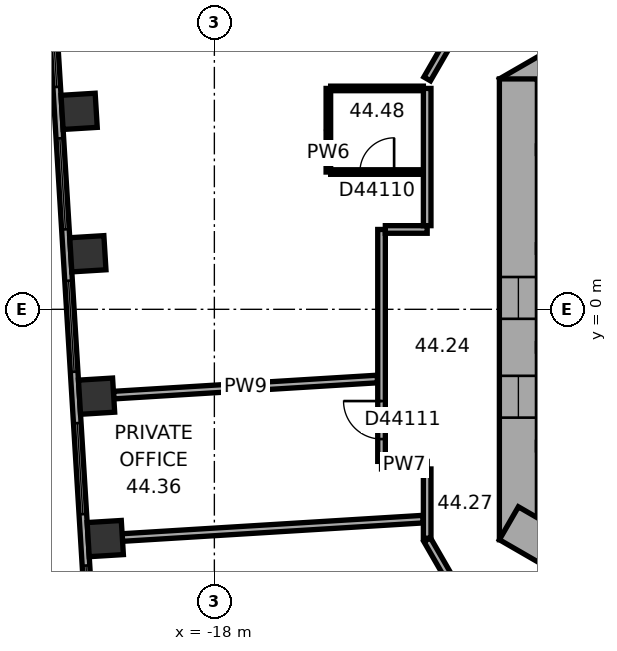
"""IFC4 building model, lengths in metres.
Left out: names, types, materials, properties, quantities, classifications, styles, units other than length and angle.
Written with IfcOpenShell. Run it as: python <this file> out.ifc"""

import sys

from ifc_helpers import new_model, si_unit, direction, frame, frame_2d, origin, origin_2d, place, context, subcontext, project, spatial, rectangle, extrude, element, fill, save


model = new_model("IFC4")
c1 = context("Model", 3, precision=1e-05, world=origin(), true_north=direction((0.0, 1.0)))
c2 = subcontext(c1, "Body", "Model", "MODEL_VIEW")
j1 = project(units=[si_unit("LENGTHUNIT", "METRE"), si_unit("PLANEANGLEUNIT", "RADIAN")], contexts=[c1])
p1 = place(None, origin())
s1 = spatial("IfcSite", under=j1, at=p1, CompositionType="ELEMENT")
p2 = place(p1, origin())
s2 = spatial("IfcBuilding", under=s1, at=p2, CompositionType="ELEMENT")
p3 = place(p2, frame((0.0, 0.0, 179.9)))
s3 = spatial("IfcBuildingStorey", under=s2, at=p3, CompositionType="ELEMENT", Elevation=179.9)
for number, where, z_axis, x_axis in (
    (1, (-21.558, 5.209, 0.0), (0.0, 0.0, 1.0), (0.061, -0.998, 0.0)),
    (2, (-21.329, 1.462, 0.0), (0.0, 0.0, 1.0), (0.061, -0.998, 0.0)),
    (3, (-21.1, -2.285, 0.0), (0.0, 0.0, 1.0), (0.061, -0.998, 0.0)),
    (4, (-20.871, -6.032, 0.0), (0.0, 0.0, 1.0), (0.061, -0.998, 0.0)),
):
    element("IfcColumn", number, at=place(p3, frame(where, z_axis=z_axis, x_axis=x_axis)), inside=s3, PredefinedType="COLUMN", context=c2, shape_type="SweptSolid", body=[
        extrude(rectangle(XDim=0.9, YDim=0.9, at=origin_2d()), origin(), (0.0, 0.0, 1.0), 3.7),
    ])
p4 = place(p3, frame((0.25, 11.691, 0.0), z_axis=(0.0, 0.0, 1.0), x_axis=(-0.866022616891, -0.50000482701, 0.0)))
e5 = element("IfcWall", 5, at=p4, inside=s3, PredefinedType="SHEAR", context=c2, shape_type="SweptSolid", body=[
    extrude(rectangle(XDim=12.125, YDim=1.0, at=frame_2d((6.062, 0.0))), origin(), (0.0, 0.0, 1.0), 3.7),
])
p5 = place(p4, frame((6.262, 0.0, 0.0)))
e6 = element("IfcOpeningElement", 6, at=p5, cuts=e5, PredefinedType="OPENING", context=c2, shape_type="SweptSolid", body=[
    extrude(rectangle(XDim=1.5, YDim=2.1, at=frame_2d((0.75, 1.05))), frame((0.0, 0.51, 0.0), z_axis=(0.0, -1.0, 0.0), x_axis=(1.0, 0.0, 0.0)), (0.0, 0.0, 1.0), 1.02),
])
p6 = place(p4, frame((1.812, 0.0, 0.0)))
e7 = element("IfcOpeningElement", 7, at=p6, cuts=e5, PredefinedType="OPENING", context=c2, shape_type="SweptSolid", body=[
    extrude(rectangle(XDim=0.9, YDim=2.1, at=frame_2d((0.45, 1.05))), frame((0.0, 0.51, 0.0), z_axis=(0.0, -1.0, 0.0), x_axis=(1.0, 0.0, 0.0)), (0.0, 0.0, 1.0), 1.02),
])
p7 = place(p4, frame((4.412, 0.0, 0.0)))
e8 = element("IfcOpeningElement", 8, at=p7, cuts=e5, PredefinedType="OPENING", context=c2, shape_type="SweptSolid", body=[
    extrude(rectangle(XDim=0.9, YDim=2.1, at=frame_2d((0.45, 1.05))), frame((0.0, 0.51, 0.0), z_axis=(0.0, -1.0, 0.0), x_axis=(1.0, 0.0, 0.0)), (0.0, 0.0, 1.0), 1.02),
])
p8 = place(p3, frame((-10.0, 6.062, 0.0), z_axis=(0.0, 0.0, 1.0), x_axis=(0.0, -1.0, 0.0)))
e9 = element("IfcWall", 9, at=p8, inside=s3, PredefinedType="SHEAR", context=c2, shape_type="SweptSolid", body=[
    extrude(rectangle(XDim=12.125, YDim=1.0, at=frame_2d((6.062, 0.0))), origin(), (0.0, 0.0, 1.0), 3.7),
])
p9 = place(p8, frame((5.212, 0.0, 0.0)))
e10 = element("IfcOpeningElement", 10, at=p9, cuts=e9, PredefinedType="OPENING", context=c2, shape_type="SweptSolid", body=[
    extrude(rectangle(XDim=1.1, YDim=2.1, at=frame_2d((0.55, 1.05))), frame((0.0, 0.51, 0.0), z_axis=(0.0, -1.0, 0.0), x_axis=(1.0, 0.0, 0.0)), (0.0, 0.0, 1.0), 1.02),
])
p10 = place(p8, frame((7.812, 0.0, 0.0)))
e11 = element("IfcOpeningElement", 11, at=p10, cuts=e9, PredefinedType="OPENING", context=c2, shape_type="SweptSolid", body=[
    extrude(rectangle(XDim=1.1, YDim=2.1, at=frame_2d((0.55, 1.05))), frame((0.0, 0.51, 0.0), z_axis=(0.0, -1.0, 0.0), x_axis=(1.0, 0.0, 0.0)), (0.0, 0.0, 1.0), 1.02),
])
p11 = place(p3, frame((-10.25, -5.629, 0.0), z_axis=(0.0, 0.0, 1.0), x_axis=(0.866022616891, -0.50000482701, 0.0)))
e12 = element("IfcWall", 12, at=p11, inside=s3, PredefinedType="SHEAR", context=c2, shape_type="SweptSolid", body=[
    extrude(rectangle(XDim=12.125, YDim=1.0, at=frame_2d((6.062, 0.0))), origin(), (0.0, 0.0, 1.0), 3.7),
])
p12 = place(p11, frame((6.262, 0.0, 0.0)))
e13 = element("IfcOpeningElement", 13, at=p12, cuts=e12, PredefinedType="OPENING", context=c2, shape_type="SweptSolid", body=[
    extrude(rectangle(XDim=1.5, YDim=2.1, at=frame_2d((0.75, 1.05))), frame((0.0, 0.51, 0.0), z_axis=(0.0, -1.0, 0.0), x_axis=(1.0, 0.0, 0.0)), (0.0, 0.0, 1.0), 1.02),
])
p13 = place(p11, frame((1.712, 0.0, 0.0)))
e14 = element("IfcOpeningElement", 14, at=p13, cuts=e12, PredefinedType="OPENING", context=c2, shape_type="SweptSolid", body=[
    extrude(rectangle(XDim=1.1, YDim=2.1, at=frame_2d((0.55, 1.05))), frame((0.0, 0.51, 0.0), z_axis=(0.0, -1.0, 0.0), x_axis=(1.0, 0.0, 0.0)), (0.0, 0.0, 1.0), 1.02),
])
p14 = place(p11, frame((4.312, 0.0, 0.0)))
e15 = element("IfcOpeningElement", 15, at=p14, cuts=e12, PredefinedType="OPENING", context=c2, shape_type="SweptSolid", body=[
    extrude(rectangle(XDim=1.1, YDim=2.1, at=frame_2d((0.55, 1.05))), frame((0.0, 0.51, 0.0), z_axis=(0.0, -1.0, 0.0), x_axis=(1.0, 0.0, 0.0)), (0.0, 0.0, 1.0), 1.02),
])
p15 = place(p3, frame((-22.375, 9.557, 0.0), z_axis=(0.0, 0.0, 1.0), x_axis=(0.061036015339, -0.998135564356, 0.0)))
e16 = element("IfcWall", 16, at=p15, inside=s3, PredefinedType="STANDARD", context=c2, shape_type="SweptSolid", body=[
    extrude(rectangle(XDim=20.044, YDim=0.2, at=frame_2d((10.022, 0.0))), origin(), (0.0, 0.0, 1.0), 3.7),
])
p16 = place(p15, frame((1.313, 0.0, 0.9)))
e17 = element("IfcOpeningElement", 17, at=p16, cuts=e16, PredefinedType="OPENING", context=c2, shape_type="SweptSolid", body=[
    extrude(rectangle(XDim=2.4, YDim=2.0, at=frame_2d((1.2, 1.0))), frame((0.0, 0.11, 0.0), z_axis=(0.0, -1.0, 0.0), x_axis=(1.0, 0.0, 0.0)), (0.0, 0.0, 1.0), 0.22),
])
p17 = place(p15, frame((5.067, 0.0, 0.9)))
e18 = element("IfcOpeningElement", 18, at=p17, cuts=e16, PredefinedType="OPENING", context=c2, shape_type="SweptSolid", body=[
    extrude(rectangle(XDim=2.4, YDim=2.0, at=frame_2d((1.2, 1.0))), frame((0.0, 0.11, 0.0), z_axis=(0.0, -1.0, 0.0), x_axis=(1.0, 0.0, 0.0)), (0.0, 0.0, 1.0), 0.22),
])
p18 = place(p15, frame((8.821, 0.0, 0.9)))
e19 = element("IfcOpeningElement", 19, at=p18, cuts=e16, PredefinedType="OPENING", context=c2, shape_type="SweptSolid", body=[
    extrude(rectangle(XDim=2.4, YDim=2.0, at=frame_2d((1.2, 1.0))), frame((0.0, 0.11, 0.0), z_axis=(0.0, -1.0, 0.0), x_axis=(1.0, 0.0, 0.0)), (0.0, 0.0, 1.0), 0.22),
])
p19 = place(p15, frame((12.575, 0.0, 0.9)))
e20 = element("IfcOpeningElement", 20, at=p19, cuts=e16, PredefinedType="OPENING", context=c2, shape_type="SweptSolid", body=[
    extrude(rectangle(XDim=2.4, YDim=2.0, at=frame_2d((1.2, 1.0))), frame((0.0, 0.11, 0.0), z_axis=(0.0, -1.0, 0.0), x_axis=(1.0, 0.0, 0.0)), (0.0, 0.0, 1.0), 0.22),
])
p20 = place(p15, frame((16.329, 0.0, 0.9)))
e21 = element("IfcOpeningElement", 21, at=p20, cuts=e16, PredefinedType="OPENING", context=c2, shape_type="SweptSolid", body=[
    extrude(rectangle(XDim=2.4, YDim=2.0, at=frame_2d((1.2, 1.0))), frame((0.0, 0.11, 0.0), z_axis=(0.0, -1.0, 0.0), x_axis=(1.0, 0.0, 0.0)), (0.0, 0.0, 1.0), 0.22),
])
for number, where, z_axis, x_axis in (
    (22, (-7.3, 4.2, 0.0), (0.0, 0.0, 1.0), (-1.0, 0.0, 0.0)),
    (23, (-7.3, 1.6, 0.0), (0.0, 0.0, 1.0), (-1.0, 0.0, 0.0)),
    (24, (-7.3, -1.0, 0.0), (0.0, 0.0, 1.0), (-1.0, 0.0, 0.0)),
    (25, (-7.3, -3.6, 0.0), (0.0, 0.0, 1.0), (-1.0, 0.0, 0.0)),
):
    element("IfcWall", number, at=place(p3, frame(where, z_axis=z_axis, x_axis=x_axis)), inside=s3, PredefinedType="PARTITIONING", context=c2, shape_type="SweptSolid", body=[
        extrude(rectangle(XDim=2.2, YDim=0.2, at=frame_2d((1.1, 0.0))), origin(), (0.0, 0.0, 1.0), 3.42),
    ])
p21 = place(p3, frame((-20.651, -2.258, 0.0), z_axis=(0.0, 0.0, 1.0), x_axis=(0.998133960965, 0.061062230286, 0.0)))
e26 = element("IfcWall", 26, at=p21, inside=s3, PredefinedType="PARTITIONING", context=c2, shape_type="SweptSolid", body=[
    extrude(rectangle(XDim=6.953, YDim=0.2, at=frame_2d((3.477, 0.0))), origin(), (0.0, 0.0, 1.0), 3.42),
])
p22 = place(p3, frame((-20.421, -6.005, 0.0), z_axis=(0.0, 0.0, 1.0), x_axis=(0.998134865741, 0.061047438866, 0.0)))
e27 = element("IfcWall", 27, at=p22, inside=s3, PredefinedType="PARTITIONING", context=c2, shape_type="SweptSolid", body=[
    extrude(rectangle(XDim=7.927, YDim=0.2, at=frame_2d((3.963, 0.0))), origin(), (0.0, 0.0, 1.0), 2.87),
])
p23 = place(p3, frame((-15.0, 3.612, 0.0), z_axis=(0.0, 0.0, 1.0), x_axis=(0.0, 1.0, 0.0)))
e28 = element("IfcWall", 28, at=p23, inside=s3, PredefinedType="PARTITIONING", context=c2, shape_type="SweptSolid", body=[
    extrude(rectangle(XDim=2.2, YDim=0.12, at=frame_2d((1.1, 0.0))), origin(), (0.0, 0.0, 1.0), 3.42),
])
p24 = place(p3, frame((-14.94, 5.812, 0.0), z_axis=(0.0, 0.0, 1.0), x_axis=(1.0, 0.0, 0.0)))
e29 = element("IfcWall", 29, at=p24, inside=s3, PredefinedType="PARTITIONING", context=c2, shape_type="SweptSolid", body=[
    extrude(rectangle(XDim=2.44, YDim=0.12, at=frame_2d((1.22, 0.0))), origin(), (0.0, 0.0, 1.0), 3.42),
])
p25 = place(p3, frame((-13.601, -4.101, 0.0), z_axis=(0.0, 0.0, 1.0), x_axis=(1.0, 0.0, 0.0)))
e30 = element("IfcWall", 30, at=p25, inside=s3, PredefinedType="PARTITIONING", context=c2, shape_type="SweptSolid", body=[
    extrude(rectangle(XDim=1.201, YDim=0.2, at=frame_2d((0.601, 0.0))), origin(), (0.0, 0.0, 1.0), 3.42),
])
p26 = place(p3, frame((-13.601, 2.101, 0.0), z_axis=(0.0, 0.0, 1.0), x_axis=(0.0, -1.0, 0.0)))
e31 = element("IfcWall", 31, at=p26, inside=s3, PredefinedType="PARTITIONING", context=c2, shape_type="SweptSolid", body=[
    extrude(rectangle(XDim=6.102, YDim=0.2, at=frame_2d((3.051, 0.0))), origin(), (0.0, 0.0, 1.0), 3.42),
])
p27 = place(p26, frame((4.515, 0.0, 0.0)))
e32 = element("IfcOpeningElement", 32, at=p27, cuts=e31, PredefinedType="OPENING", context=c2, shape_type="SweptSolid", body=[
    extrude(rectangle(XDim=1.0, YDim=2.1, at=frame_2d((0.5, 1.05))), frame((0.0, 0.11, 0.0), z_axis=(0.0, -1.0, 0.0), x_axis=(1.0, 0.0, 0.0)), (0.0, 0.0, 1.0), 0.22),
])
p28 = place(p3, frame((-12.5, 3.612, 0.0), z_axis=(0.0, 0.0, 1.0), x_axis=(-1.0, 0.0, 0.0)))
e33 = element("IfcWall", 33, at=p28, inside=s3, PredefinedType="PARTITIONING", context=c2, shape_type="SweptSolid", body=[
    extrude(rectangle(XDim=2.44, YDim=0.12, at=frame_2d((1.22, 0.0))), origin(), (0.0, 0.0, 1.0), 3.42),
])
p29 = place(p28, frame((0.77, 0.0, 0.0)))
e34 = element("IfcOpeningElement", 34, at=p29, cuts=e33, PredefinedType="OPENING", context=c2, shape_type="SweptSolid", body=[
    extrude(rectangle(XDim=0.9, YDim=2.1, at=frame_2d((0.45, 1.05))), frame((0.0, 0.07, 0.0), z_axis=(0.0, -1.0, 0.0), x_axis=(1.0, 0.0, 0.0)), (0.0, 0.0, 1.0), 0.14),
])
p30 = place(p3, frame((-12.4, -6.062, 0.0), z_axis=(0.0, 0.0, 1.0), x_axis=(0.500022797313, -0.86601224135, 0.0)))
e35 = element("IfcWall", 35, at=p30, inside=s3, PredefinedType="PARTITIONING", context=c2, shape_type="SweptSolid", body=[
    extrude(rectangle(XDim=1.9, YDim=0.2, at=frame_2d((0.95, 0.0))), origin(), (0.0, 0.0, 1.0), 3.42),
])
p31 = place(p3, frame((-12.4, -4.201, 0.0), z_axis=(0.0, 0.0, 1.0), x_axis=(0.0, -1.0, 0.0)))
e36 = element("IfcWall", 36, at=p31, inside=s3, PredefinedType="PARTITIONING", context=c2, shape_type="SweptSolid", body=[
    extrude(rectangle(XDim=1.821, YDim=0.2, at=frame_2d((0.911, 0.0))), origin(), (0.0, 0.0, 1.0), 3.42),
])
p32 = place(p3, frame((-12.4, 2.101, 0.0), z_axis=(0.0, 0.0, 1.0), x_axis=(-1.0, 0.0, 0.0)))
e37 = element("IfcWall", 37, at=p32, inside=s3, PredefinedType="PARTITIONING", context=c2, shape_type="SweptSolid", body=[
    extrude(rectangle(XDim=1.101, YDim=0.2, at=frame_2d((0.551, 0.0))), origin(), (0.0, 0.0, 1.0), 3.42),
])
p33 = place(p3, frame((-12.4, 5.812, 0.0), z_axis=(0.0, 0.0, 1.0), x_axis=(0.0, -1.0, 0.0)))
e38 = element("IfcWall", 38, at=p33, inside=s3, PredefinedType="PARTITIONING", context=c2, shape_type="SweptSolid", body=[
    extrude(rectangle(XDim=3.611, YDim=0.2, at=frame_2d((1.806, 0.0))), origin(), (0.0, 0.0, 1.0), 3.42),
])
p34 = place(p3, frame((-11.45, 7.708, 0.0), z_axis=(0.0, 0.0, 1.0), x_axis=(-0.500022797313, -0.86601224135, 0.0)))
e39 = element("IfcWall", 39, at=p34, inside=s3, PredefinedType="PARTITIONING", context=c2, shape_type="SweptSolid", body=[
    extrude(rectangle(XDim=1.9, YDim=0.2, at=frame_2d((0.95, 0.0))), origin(), (0.0, 0.0, 1.0), 3.42),
])
p35 = place(p16, origin())
e40 = element("IfcWindow", 40, at=p35, inside=s3, PartitioningType="SINGLE_PANEL", PredefinedType="WINDOW", context=c2, shape_type="SweptSolid", body=[
    extrude(rectangle(XDim=2.4, YDim=2.0, at=frame_2d((1.2, 1.0))), frame((0.0, 0.03, 0.0), z_axis=(0.0, -1.0, 0.0), x_axis=(1.0, 0.0, 0.0)), (0.0, 0.0, 1.0), 0.06),
])
fill(e17, e40)
p36 = place(p17, origin())
e41 = element("IfcWindow", 41, at=p36, inside=s3, PartitioningType="SINGLE_PANEL", PredefinedType="WINDOW", context=c2, shape_type="SweptSolid", body=[
    extrude(rectangle(XDim=2.4, YDim=2.0, at=frame_2d((1.2, 1.0))), frame((0.0, 0.03, 0.0), z_axis=(0.0, -1.0, 0.0), x_axis=(1.0, 0.0, 0.0)), (0.0, 0.0, 1.0), 0.06),
])
fill(e18, e41)
p37 = place(p18, origin())
e42 = element("IfcWindow", 42, at=p37, inside=s3, PartitioningType="SINGLE_PANEL", PredefinedType="WINDOW", context=c2, shape_type="SweptSolid", body=[
    extrude(rectangle(XDim=2.4, YDim=2.0, at=frame_2d((1.2, 1.0))), frame((0.0, 0.03, 0.0), z_axis=(0.0, -1.0, 0.0), x_axis=(1.0, 0.0, 0.0)), (0.0, 0.0, 1.0), 0.06),
])
fill(e19, e42)
p38 = place(p19, origin())
e43 = element("IfcWindow", 43, at=p38, inside=s3, PartitioningType="SINGLE_PANEL", PredefinedType="WINDOW", context=c2, shape_type="SweptSolid", body=[
    extrude(rectangle(XDim=2.4, YDim=2.0, at=frame_2d((1.2, 1.0))), frame((0.0, 0.03, 0.0), z_axis=(0.0, -1.0, 0.0), x_axis=(1.0, 0.0, 0.0)), (0.0, 0.0, 1.0), 0.06),
])
fill(e20, e43)
p39 = place(p20, origin())
e44 = element("IfcWindow", 44, at=p39, inside=s3, PartitioningType="SINGLE_PANEL", PredefinedType="WINDOW", context=c2, shape_type="SweptSolid", body=[
    extrude(rectangle(XDim=2.4, YDim=2.0, at=frame_2d((1.2, 1.0))), frame((0.0, 0.03, 0.0), z_axis=(0.0, -1.0, 0.0), x_axis=(1.0, 0.0, 0.0)), (0.0, 0.0, 1.0), 0.06),
])
fill(e21, e44)
p40 = place(p9, origin())
e45 = element("IfcDoor", 45, at=p40, inside=s3, OperationType="DOUBLE_DOOR_SLIDING", PredefinedType="DOOR", context=c2, shape_type="SweptSolid", body=[
    extrude(rectangle(XDim=1.1, YDim=2.1, at=frame_2d((0.55, 1.05))), frame((0.0, 0.025, 0.0), z_axis=(0.0, -1.0, 0.0), x_axis=(1.0, 0.0, 0.0)), (0.0, 0.0, 1.0), 0.05),
])
fill(e10, e45)
p41 = place(p10, origin())
e46 = element("IfcDoor", 46, at=p41, inside=s3, OperationType="DOUBLE_DOOR_SLIDING", PredefinedType="DOOR", context=c2, shape_type="SweptSolid", body=[
    extrude(rectangle(XDim=1.1, YDim=2.1, at=frame_2d((0.55, 1.05))), frame((0.0, 0.025, 0.0), z_axis=(0.0, -1.0, 0.0), x_axis=(1.0, 0.0, 0.0)), (0.0, 0.0, 1.0), 0.05),
])
fill(e11, e46)
p42 = place(p29, origin())
e47 = element("IfcDoor", 47, at=p42, inside=s3, OperationType="SINGLE_SWING_LEFT", PredefinedType="DOOR", context=c2, shape_type="SweptSolid", body=[
    extrude(rectangle(XDim=0.9, YDim=2.1, at=frame_2d((0.45, 1.05))), frame((0.0, 0.025, 0.0), z_axis=(0.0, -1.0, 0.0), x_axis=(1.0, 0.0, 0.0)), (0.0, 0.0, 1.0), 0.05),
])
fill(e34, e47)
p43 = place(p27, origin())
e48 = element("IfcDoor", 48, at=p43, inside=s3, OperationType="SINGLE_SWING_LEFT", PredefinedType="DOOR", context=c2, shape_type="SweptSolid", body=[
    extrude(rectangle(XDim=1.0, YDim=2.1, at=frame_2d((0.5, 1.05))), frame((0.0, 0.025, 0.0), z_axis=(0.0, -1.0, 0.0), x_axis=(1.0, 0.0, 0.0)), (0.0, 0.0, 1.0), 0.05),
])
fill(e32, e48)
save(model, sys.argv[1])
